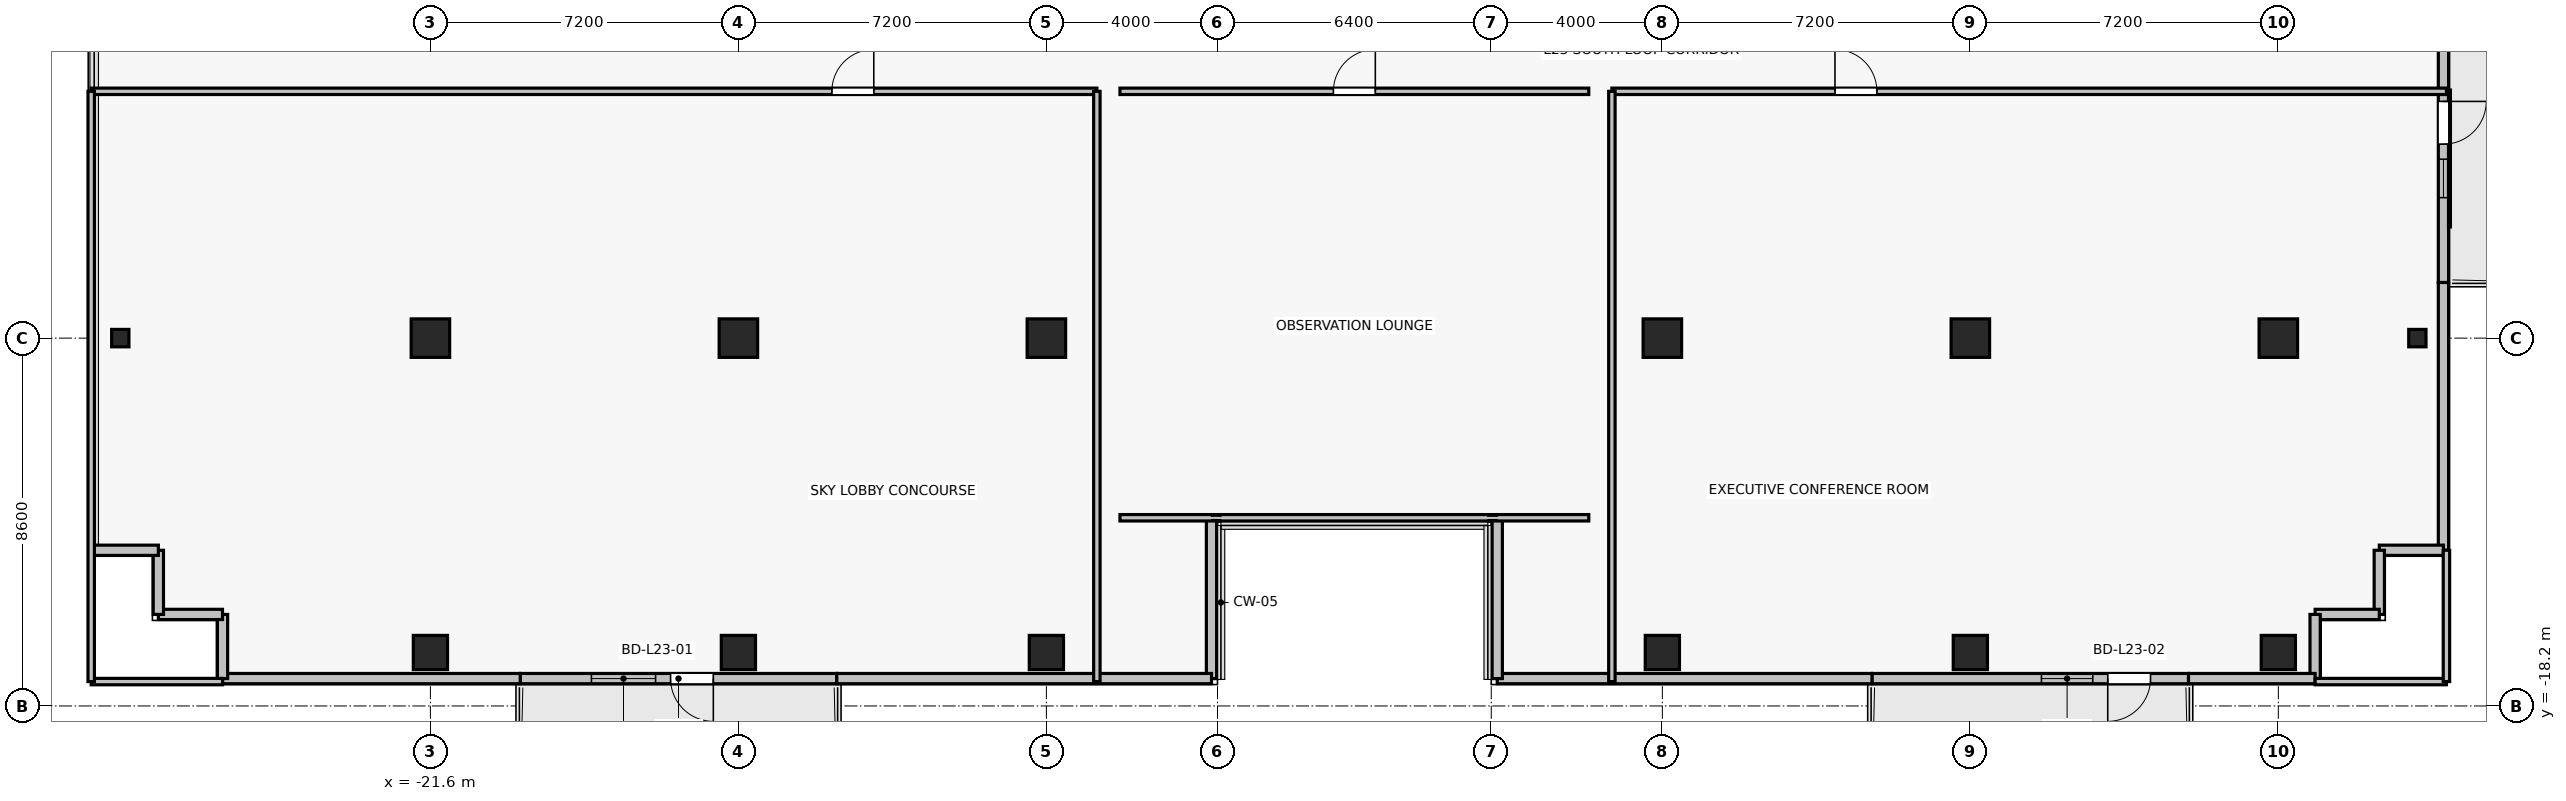
"""IFC4 building model, lengths in metres.
Left out: names, types, materials, properties, quantities, classifications, styles, units other than length and angle.
Written with IfcOpenShell. Run it as: python <this file> out.ifc"""

import sys

from ifc_helpers import new_model, si_unit, direction, frame, frame_2d, origin, origin_2d, place, context, subcontext, project, spatial, rectangle, i_section, extrude, source, transform, mapped, element, fill, save


model = new_model("IFC4")
c1 = context("Model", 3, precision=1e-05, world=origin(), true_north=direction((0.0, 1.0)))
c2 = subcontext(c1, "Body", "Model", "MODEL_VIEW")
j1 = project(units=[si_unit("LENGTHUNIT", "METRE"), si_unit("PLANEANGLEUNIT", "RADIAN")], contexts=[c1])
p1 = place(None, origin())
s1 = spatial("IfcSite", under=j1, at=p1, CompositionType="ELEMENT")
p2 = place(p1, origin())
s2 = spatial("IfcBuilding", under=s1, at=p2, CompositionType="ELEMENT")
p3 = place(p2, frame((0.0, 0.0, 86.8)))
s3 = spatial("IfcBuildingStorey", under=s2, at=p3, CompositionType="ELEMENT", Elevation=86.8)
for number, where, z_axis, x_axis in (
    (1, (-14.4, -9.6, 0.0), (0.0, 0.0, 1.0), (1.0, 0.0, 0.0)),
    (2, (-7.2, -9.6, 0.0), (0.0, 0.0, 1.0), (1.0, 0.0, 0.0)),
    (3, (7.2, -9.6, 0.0), (0.0, 0.0, 1.0), (1.0, 0.0, 0.0)),
    (4, (14.4, -9.6, 0.0), (0.0, 0.0, 1.0), (1.0, 0.0, 0.0)),
    (5, (-21.6, -9.6, 0.0), (0.0, 0.0, 1.0), (1.0, 0.0, 0.0)),
    (6, (21.6, -9.6, 0.0), (0.0, 0.0, 1.0), (1.0, 0.0, 0.0)),
):
    element("IfcColumn", number, at=place(p3, frame(where, z_axis=z_axis, x_axis=x_axis)), inside=s3, PredefinedType="COLUMN", context=c2, shape_type="SweptSolid", body=[
        extrude(rectangle(XDim=0.9, YDim=0.9, at=origin_2d()), origin(), (0.0, 0.0, 1.0), 3.3),
    ])
for number, where, z_axis, x_axis in (
    (7, (-14.4, -16.95, 0.0), (0.0, 0.0, 1.0), (1.0, 0.0, 0.0)),
    (8, (-7.2, -16.95, 0.0), (0.0, 0.0, 1.0), (1.0, 0.0, 0.0)),
    (9, (7.2, -16.95, 0.0), (0.0, 0.0, 1.0), (1.0, 0.0, 0.0)),
    (10, (14.4, -16.95, 0.0), (0.0, 0.0, 1.0), (1.0, 0.0, 0.0)),
    (11, (-21.6, -16.95, 0.0), (0.0, 0.0, 1.0), (1.0, 0.0, 0.0)),
    (12, (21.6, -16.95, 0.0), (0.0, 0.0, 1.0), (1.0, 0.0, 0.0)),
):
    element("IfcColumn", number, at=place(p3, frame(where, z_axis=z_axis, x_axis=x_axis)), inside=s3, PredefinedType="COLUMN", context=c2, shape_type="SweptSolid", body=[
        extrude(rectangle(XDim=0.8, YDim=0.8, at=origin_2d()), origin(), (0.0, 0.0, 1.0), 3.3),
    ])
for number, where, z_axis, x_axis in (
    (13, (-28.85, -9.6, 0.0), (0.0, 0.0, 1.0), (1.0, 0.0, 0.0)),
    (14, (24.85, -9.6, 0.0), (0.0, 0.0, 1.0), (1.0, 0.0, 0.0)),
):
    element("IfcColumn", number, at=place(p3, frame(where, z_axis=z_axis, x_axis=x_axis)), inside=s3, PredefinedType="COLUMN", context=c2, shape_type="SweptSolid", body=[
        extrude(i_section(OverallWidth=0.404, OverallDepth=0.407, WebThickness=0.022, FlangeThickness=0.032, FilletRadius=0.015, at=origin_2d()), origin(), (0.0, 0.0, 1.0), 3.3),
    ])
p4 = place(p3, frame((-12.1, -17.56, 0.0), z_axis=(0.0, 0.0, 1.0), x_axis=(-1.0, 0.0, 0.0)))
e15 = element("IfcWall", 15, at=p4, inside=s3, PredefinedType="SOLIDWALL", context=c2, shape_type="SweptSolid", body=[
    extrude(rectangle(XDim=7.4, YDim=0.24, at=frame_2d((3.7, 0.0))), origin(), (0.0, 0.0, 1.0), 2.665),
])
p5 = place(p4, frame((2.886, 0.0, 0.0)))
e16 = element("IfcOpeningElement", 16, at=p5, cuts=e15, PredefinedType="OPENING", context=c2, shape_type="SweptSolid", body=[
    extrude(rectangle(XDim=1.0, YDim=2.2, at=frame_2d((0.5, 1.1))), frame((0.0, 0.13, 0.0), z_axis=(0.0, -1.0, 0.0), x_axis=(1.0, 0.0, 0.0)), (0.0, 0.0, 1.0), 0.26),
])
p6 = place(p4, frame((4.236, 0.0, 0.85)))
e17 = element("IfcOpeningElement", 17, at=p6, cuts=e15, PredefinedType="OPENING", context=c2, shape_type="SweptSolid", body=[
    extrude(rectangle(XDim=1.5, YDim=1.6, at=frame_2d((0.75, 0.8))), frame((0.0, 0.13, 0.0), z_axis=(0.0, -1.0, 0.0), x_axis=(1.0, 0.0, 0.0)), (0.0, 0.0, 1.0), 0.26),
])
p7 = place(p3, frame((19.5, -17.56, 0.0), z_axis=(0.0, 0.0, 1.0), x_axis=(-1.0, 0.0, 0.0)))
e18 = element("IfcWall", 18, at=p7, inside=s3, PredefinedType="SOLIDWALL", context=c2, shape_type="SweptSolid", body=[
    extrude(rectangle(XDim=7.4, YDim=0.24, at=frame_2d((3.7, 0.0))), origin(), (0.0, 0.0, 1.0), 2.665),
])
p8 = place(p7, frame((0.888, 0.0, 0.0)))
e19 = element("IfcOpeningElement", 19, at=p8, cuts=e18, PredefinedType="OPENING", context=c2, shape_type="SweptSolid", body=[
    extrude(rectangle(XDim=1.0, YDim=2.2, at=frame_2d((0.5, 1.1))), frame((0.0, 0.13, 0.0), z_axis=(0.0, -1.0, 0.0), x_axis=(1.0, 0.0, 0.0)), (0.0, 0.0, 1.0), 0.26),
])
p9 = place(p7, frame((2.238, 0.0, 0.85)))
e20 = element("IfcOpeningElement", 20, at=p9, cuts=e18, PredefinedType="OPENING", context=c2, shape_type="SweptSolid", body=[
    extrude(rectangle(XDim=1.2, YDim=1.5, at=frame_2d((0.6, 0.75))), frame((0.0, 0.13, 0.0), z_axis=(0.0, -1.0, 0.0), x_axis=(1.0, 0.0, 0.0)), (0.0, 0.0, 1.0), 0.26),
])
p10 = place(p3, frame((25.46, -2.5, 0.0), z_axis=(0.0, 0.0, 1.0), x_axis=(0.0, -1.0, 0.0)))
e21 = element("IfcWall", 21, at=p10, inside=s3, PredefinedType="SOLIDWALL", context=c2, shape_type="SweptSolid", body=[
    extrude(rectangle(XDim=5.8, YDim=0.24, at=frame_2d((2.9, 0.0))), origin(), (0.0, 0.0, 1.0), 3.075),
])
p11 = place(p10, frame((1.566, 0.0, 0.0)))
e22 = element("IfcOpeningElement", 22, at=p11, cuts=e21, PredefinedType="OPENING", context=c2, shape_type="SweptSolid", body=[
    extrude(rectangle(XDim=1.0, YDim=2.2, at=frame_2d((0.5, 1.1))), frame((0.0, 0.13, 0.0), z_axis=(0.0, -1.0, 0.0), x_axis=(1.0, 0.0, 0.0)), (0.0, 0.0, 1.0), 0.26),
])
p12 = place(p10, frame((2.916, 0.0, 0.85)))
e23 = element("IfcOpeningElement", 23, at=p12, cuts=e21, PredefinedType="OPENING", context=c2, shape_type="SweptSolid", body=[
    extrude(rectangle(XDim=0.9, YDim=1.35, at=frame_2d((0.45, 0.675))), frame((0.0, 0.13, 0.0), z_axis=(0.0, -1.0, 0.0), x_axis=(1.0, 0.0, 0.0)), (0.0, 0.0, 1.0), 0.26),
])
p13 = place(p3, frame((25.46, -14.56, 0.0), z_axis=(0.0, 0.0, 1.0), x_axis=(0.0, 1.0, 0.0)))
e24 = element("IfcWall", 24, at=p13, inside=s3, PredefinedType="SOLIDWALL", context=c2, shape_type="SweptSolid", body=[
    extrude(rectangle(XDim=6.26, YDim=0.24, at=frame_2d((3.13, 0.0))), origin(), (0.0, 0.0, 1.0), 3.075),
])
for number, where, z_axis, x_axis in (
    (25, (23.96, -14.56, 0.0), (0.0, 0.0, 1.0), (1.0, 0.0, 0.0)),
    (26, (23.96, -16.06, 0.0), (0.0, 0.0, 1.0), (0.0, 1.0, 0.0)),
    (27, (22.46, -16.06, 0.0), (0.0, 0.0, 1.0), (1.0, 0.0, 0.0)),
):
    element("IfcWall", number, at=place(p3, frame(where, z_axis=z_axis, x_axis=x_axis)), inside=s3, PredefinedType="SOLIDWALL", context=c2, shape_type="SweptSolid", body=[
        extrude(rectangle(XDim=1.5, YDim=0.24, at=frame_2d((0.75, 0.0))), origin(), (0.0, 0.0, 1.0), 3.075),
    ])
p14 = place(p3, frame((22.46, -17.56, 0.0), z_axis=(0.0, 0.0, 1.0), x_axis=(0.0, 1.0, 0.0)))
e28 = element("IfcWall", 28, at=p14, inside=s3, PredefinedType="SOLIDWALL", context=c2, shape_type="SweptSolid", body=[
    extrude(rectangle(XDim=1.5, YDim=0.24, at=frame_2d((0.75, 0.0))), origin(), (0.0, 0.0, 1.0), 2.565),
])
p15 = place(p3, frame((19.5, -17.56, 0.0), z_axis=(0.0, 0.0, 1.0), x_axis=(1.0, 0.0, 0.0)))
e29 = element("IfcWall", 29, at=p15, inside=s3, PredefinedType="SOLIDWALL", context=c2, shape_type="SweptSolid", body=[
    extrude(rectangle(XDim=2.96, YDim=0.24, at=frame_2d((1.48, 0.0))), origin(), (0.0, 0.0, 1.0), 2.665),
])
p16 = place(p3, frame((3.34, -17.56, 0.0), z_axis=(0.0, 0.0, 1.0), x_axis=(1.0, 0.0, 0.0)))
e30 = element("IfcWall", 30, at=p16, inside=s3, PredefinedType="SOLIDWALL", context=c2, shape_type="SweptSolid", body=[
    extrude(rectangle(XDim=8.76, YDim=0.24, at=frame_2d((4.38, 0.0))), origin(), (0.0, 0.0, 1.0), 3.075),
])
for number, where, z_axis, x_axis in (
    (31, (3.34, -13.76, 0.0), (0.0, 0.0, 1.0), (0.0, -1.0, 0.0)),
    (32, (-3.34, -17.56, 0.0), (0.0, 0.0, 1.0), (0.0, 1.0, 0.0)),
):
    element("IfcWall", number, at=place(p3, frame(where, z_axis=z_axis, x_axis=x_axis)), inside=s3, PredefinedType="SOLIDWALL", context=c2, shape_type="SweptSolid", body=[
        extrude(rectangle(XDim=3.8, YDim=0.24, at=frame_2d((1.9, 0.0))), origin(), (0.0, 0.0, 1.0), 2.515),
    ])
p17 = place(p3, frame((-12.1, -17.56, 0.0), z_axis=(0.0, 0.0, 1.0), x_axis=(1.0, 0.0, 0.0)))
e33 = element("IfcWall", 33, at=p17, inside=s3, PredefinedType="SOLIDWALL", context=c2, shape_type="SweptSolid", body=[
    extrude(rectangle(XDim=8.76, YDim=0.24, at=frame_2d((4.38, 0.0))), origin(), (0.0, 0.0, 1.0), 3.075),
])
p18 = place(p3, frame((-26.46, -17.56, 0.0), z_axis=(0.0, 0.0, 1.0), x_axis=(1.0, 0.0, 0.0)))
e34 = element("IfcWall", 34, at=p18, inside=s3, PredefinedType="SOLIDWALL", context=c2, shape_type="SweptSolid", body=[
    extrude(rectangle(XDim=6.96, YDim=0.24, at=frame_2d((3.48, 0.0))), origin(), (0.0, 0.0, 1.0), 2.665),
])
for number, where, z_axis, x_axis in (
    (35, (-26.46, -16.06, 0.0), (0.0, 0.0, 1.0), (0.0, -1.0, 0.0)),
    (36, (-27.96, -16.06, 0.0), (0.0, 0.0, 1.0), (1.0, 0.0, 0.0)),
    (37, (-27.96, -14.56, 0.0), (0.0, 0.0, 1.0), (0.0, -1.0, 0.0)),
    (38, (-29.46, -14.56, 0.0), (0.0, 0.0, 1.0), (1.0, 0.0, 0.0)),
):
    element("IfcWall", number, at=place(p3, frame(where, z_axis=z_axis, x_axis=x_axis)), inside=s3, PredefinedType="SOLIDWALL", context=c2, shape_type="SweptSolid", body=[
        extrude(rectangle(XDim=1.5, YDim=0.24, at=frame_2d((0.75, 0.0))), origin(), (0.0, 0.0, 1.0), 3.075),
    ])
p19 = place(p3, frame((-26.46, -17.63, 0.0), z_axis=(0.0, 0.0, 1.0), x_axis=(-1.0, 0.0, 0.0)))
e39 = element("IfcWall", 39, at=p19, inside=s3, PredefinedType="PARTITIONING", context=c2, shape_type="SweptSolid", body=[
    extrude(rectangle(XDim=3.07, YDim=0.15, at=frame_2d((1.535, 0.0))), origin(), (0.0, 0.0, 1.0), 2.665),
])
p20 = place(p3, frame((-29.53, -3.83, 0.0), z_axis=(0.0, 0.0, 1.0), x_axis=(1.0, 0.0, 0.0)))
e40 = element("IfcWall", 40, at=p20, inside=s3, PredefinedType="PARTITIONING", context=c2, shape_type="SweptSolid", body=[
    extrude(rectangle(XDim=23.51, YDim=0.15, at=frame_2d((11.755, 0.0))), origin(), (0.0, 0.0, 1.0), 2.515),
])
p21 = place(p20, frame((17.315, 0.0, 0.0)))
e41 = element("IfcOpeningElement", 41, at=p21, cuts=e40, PredefinedType="OPENING", context=c2, shape_type="SweptSolid", body=[
    extrude(rectangle(XDim=0.98, YDim=2.15, at=frame_2d((0.49, 1.075))), frame((0.0, 0.085, 0.0), z_axis=(0.0, -1.0, 0.0), x_axis=(1.0, 0.0, 0.0)), (0.0, 0.0, 1.0), 0.17),
])
p22 = place(p3, frame((-29.53, -17.63, 0.0), z_axis=(0.0, 0.0, 1.0), x_axis=(0.0, 1.0, 0.0)))
e42 = element("IfcWall", 42, at=p22, inside=s3, PredefinedType="PARTITIONING", context=c2, shape_type="SweptSolid", body=[
    extrude(rectangle(XDim=13.8, YDim=0.15, at=frame_2d((6.9, 0.0))), origin(), (0.0, 0.0, 1.0), 2.665),
])
p23 = place(p3, frame((-6.02, -3.83, 0.0), z_axis=(0.0, 0.0, 1.0), x_axis=(0.0, -1.0, 0.0)))
e43 = element("IfcWall", 43, at=p23, inside=s3, PredefinedType="PARTITIONING", context=c2, shape_type="SweptSolid", body=[
    extrude(rectangle(XDim=13.8, YDim=0.15, at=frame_2d((6.9, 0.0))), origin(), (0.0, 0.0, 1.0), 2.515),
])
p24 = place(p3, frame((25.53, -17.63, 0.0), z_axis=(0.0, 0.0, 1.0), x_axis=(-1.0, 0.0, 0.0)))
e44 = element("IfcWall", 44, at=p24, inside=s3, PredefinedType="PARTITIONING", context=c2, shape_type="SweptSolid", body=[
    extrude(rectangle(XDim=3.07, YDim=0.15, at=frame_2d((1.535, 0.0))), origin(), (0.0, 0.0, 1.0), 2.665),
])
p25 = place(p3, frame((6.02, -3.83, 0.0), z_axis=(0.0, 0.0, 1.0), x_axis=(1.0, 0.0, 0.0)))
e45 = element("IfcWall", 45, at=p25, inside=s3, PredefinedType="PARTITIONING", context=c2, shape_type="SweptSolid", body=[
    extrude(rectangle(XDim=19.51, YDim=0.15, at=frame_2d((9.755, 0.0))), origin(), (0.0, 0.0, 1.0), 2.515),
])
p26 = place(p25, frame((5.215, 0.0, 0.0)))
e46 = element("IfcOpeningElement", 46, at=p26, cuts=e45, PredefinedType="OPENING", context=c2, shape_type="SweptSolid", body=[
    extrude(rectangle(XDim=0.98, YDim=2.15, at=frame_2d((0.49, 1.075))), frame((0.0, 0.085, 0.0), z_axis=(0.0, -1.0, 0.0), x_axis=(1.0, 0.0, 0.0)), (0.0, 0.0, 1.0), 0.17),
])
p27 = place(p3, frame((6.02, -17.63, 0.0), z_axis=(0.0, 0.0, 1.0), x_axis=(0.0, 1.0, 0.0)))
e47 = element("IfcWall", 47, at=p27, inside=s3, PredefinedType="PARTITIONING", context=c2, shape_type="SweptSolid", body=[
    extrude(rectangle(XDim=13.8, YDim=0.15, at=frame_2d((6.9, 0.0))), origin(), (0.0, 0.0, 1.0), 2.515),
])
p28 = place(p3, frame((25.53, -14.56, 0.0), z_axis=(0.0, 0.0, 1.0), x_axis=(0.0, -1.0, 0.0)))
e48 = element("IfcWall", 48, at=p28, inside=s3, PredefinedType="PARTITIONING", context=c2, shape_type="SweptSolid", body=[
    extrude(rectangle(XDim=3.07, YDim=0.15, at=frame_2d((1.535, 0.0))), origin(), (0.0, 0.0, 1.0), 3.075),
])
p29 = place(p3, frame((5.48, -13.8, 0.0), z_axis=(0.0, 0.0, 1.0), x_axis=(-1.0, 0.0, 0.0)))
e49 = element("IfcWall", 49, at=p29, inside=s3, PredefinedType="PARTITIONING", context=c2, shape_type="SweptSolid", body=[
    extrude(rectangle(XDim=10.96, YDim=0.15, at=frame_2d((5.48, 0.0))), origin(), (0.0, 0.0, 1.0), 2.565),
])
p30 = place(p3, frame((-5.48, -3.83, 0.0), z_axis=(0.0, 0.0, 1.0), x_axis=(1.0, 0.0, 0.0)))
e50 = element("IfcWall", 50, at=p30, inside=s3, PredefinedType="PARTITIONING", context=c2, shape_type="SweptSolid", body=[
    extrude(rectangle(XDim=10.96, YDim=0.15, at=frame_2d((5.48, 0.0))), origin(), (0.0, 0.0, 1.0), 3.075),
])
p31 = place(p30, frame((4.99, 0.0, 0.0)))
e51 = element("IfcOpeningElement", 51, at=p31, cuts=e50, PredefinedType="OPENING", context=c2, shape_type="SweptSolid", body=[
    extrude(rectangle(XDim=0.98, YDim=2.15, at=frame_2d((0.49, 1.075))), frame((0.0, 0.085, 0.0), z_axis=(0.0, -1.0, 0.0), x_axis=(1.0, 0.0, 0.0)), (0.0, 0.0, 1.0), 0.17),
])
m1 = source(origin(), c2, "Body", "SweptSolid", [
    extrude(rectangle(XDim=1.0, YDim=2.2, at=frame_2d((0.5, 1.1))), frame((0.0, 0.025, 0.0), z_axis=(0.0, -1.0, 0.0), x_axis=(1.0, 0.0, 0.0)), (0.0, 0.0, 1.0), 0.05),
])
p32 = place(p5, origin())
e52 = element("IfcDoor", 52, at=p32, inside=s3, OperationType="SINGLE_SWING_LEFT", PredefinedType="DOOR", context=c2, shape_type="MappedRepresentation", body=[
    mapped(m1, transform((0.0, 0.0, 0.0), x_axis=(1.0, 0.0, 0.0), y_axis=(0.0, 1.0, 0.0), z_axis=(0.0, 0.0, 1.0), scale=1.0)),
])
fill(e16, e52)
m2 = source(origin(), c2, "Body", "SweptSolid", [
    extrude(rectangle(XDim=1.5, YDim=1.6, at=frame_2d((0.75, 0.8))), frame((0.0, 0.03, 0.0), z_axis=(0.0, -1.0, 0.0), x_axis=(1.0, 0.0, 0.0)), (0.0, 0.0, 1.0), 0.06),
])
p33 = place(p6, origin())
e53 = element("IfcWindow", 53, at=p33, inside=s3, PartitioningType="SINGLE_PANEL", PredefinedType="WINDOW", context=c2, shape_type="MappedRepresentation", body=[
    mapped(m2, transform((0.0, 0.0, 0.0), x_axis=(1.0, 0.0, 0.0), y_axis=(0.0, 1.0, 0.0), z_axis=(0.0, 0.0, 1.0), scale=1.0)),
])
fill(e17, e53)
p34 = place(p8, origin())
e54 = element("IfcDoor", 54, at=p34, inside=s3, OperationType="SINGLE_SWING_RIGHT", PredefinedType="DOOR", context=c2, shape_type="MappedRepresentation", body=[
    mapped(m1, transform((0.0, 0.0, 0.0), x_axis=(1.0, 0.0, 0.0), y_axis=(0.0, 1.0, 0.0), z_axis=(0.0, 0.0, 1.0), scale=1.0)),
])
fill(e19, e54)
m3 = source(origin(), c2, "Body", "SweptSolid", [
    extrude(rectangle(XDim=1.2, YDim=1.5, at=frame_2d((0.6, 0.75))), frame((0.0, 0.03, 0.0), z_axis=(0.0, -1.0, 0.0), x_axis=(1.0, 0.0, 0.0)), (0.0, 0.0, 1.0), 0.06),
])
p35 = place(p9, origin())
e55 = element("IfcWindow", 55, at=p35, inside=s3, PartitioningType="SINGLE_PANEL", PredefinedType="WINDOW", context=c2, shape_type="MappedRepresentation", body=[
    mapped(m3, transform((0.0, 0.0, 0.0), x_axis=(1.0, 0.0, 0.0), y_axis=(0.0, 1.0, 0.0), z_axis=(0.0, 0.0, 1.0), scale=1.0)),
])
fill(e20, e55)
p36 = place(p11, origin())
e56 = element("IfcDoor", 56, at=p36, inside=s3, OperationType="SINGLE_SWING_LEFT", PredefinedType="DOOR", context=c2, shape_type="MappedRepresentation", body=[
    mapped(m1, transform((0.0, 0.0, 0.0), x_axis=(1.0, 0.0, 0.0), y_axis=(0.0, 1.0, 0.0), z_axis=(0.0, 0.0, 1.0), scale=1.0)),
])
fill(e22, e56)
m4 = source(origin(), c2, "Body", "SweptSolid", [
    extrude(rectangle(XDim=0.9, YDim=1.35, at=frame_2d((0.45, 0.675))), frame((0.0, 0.03, 0.0), z_axis=(0.0, -1.0, 0.0), x_axis=(1.0, 0.0, 0.0)), (0.0, 0.0, 1.0), 0.06),
])
p37 = place(p12, origin())
e57 = element("IfcWindow", 57, at=p37, inside=s3, PartitioningType="SINGLE_PANEL", PredefinedType="WINDOW", context=c2, shape_type="MappedRepresentation", body=[
    mapped(m4, transform((0.0, 0.0, 0.0), x_axis=(1.0, 0.0, 0.0), y_axis=(0.0, 1.0, 0.0), z_axis=(0.0, 0.0, 1.0), scale=1.0)),
])
fill(e23, e57)
m5 = source(origin(), c2, "Body", "SweptSolid", [
    extrude(rectangle(XDim=0.98, YDim=2.15, at=frame_2d((0.49, 1.075))), frame((0.0, 0.025, 0.0), z_axis=(0.0, -1.0, 0.0), x_axis=(1.0, 0.0, 0.0)), (0.0, 0.0, 1.0), 0.05),
])
p38 = place(p21, origin())
e58 = element("IfcDoor", 58, at=p38, inside=s3, OperationType="SINGLE_SWING_RIGHT", PredefinedType="DOOR", context=c2, shape_type="MappedRepresentation", body=[
    mapped(m5, transform((0.0, 0.0, 0.0), x_axis=(1.0, 0.0, 0.0), y_axis=(0.0, 1.0, 0.0), z_axis=(0.0, 0.0, 1.0), scale=1.0)),
])
fill(e41, e58)
p39 = place(p26, origin())
e59 = element("IfcDoor", 59, at=p39, inside=s3, OperationType="SINGLE_SWING_LEFT", PredefinedType="DOOR", context=c2, shape_type="MappedRepresentation", body=[
    mapped(m5, transform((0.0, 0.0, 0.0), x_axis=(1.0, 0.0, 0.0), y_axis=(0.0, 1.0, 0.0), z_axis=(0.0, 0.0, 1.0), scale=1.0)),
])
fill(e46, e59)
p40 = place(p31, origin())
e60 = element("IfcDoor", 60, at=p40, inside=s3, OperationType="SINGLE_SWING_RIGHT", PredefinedType="DOOR", context=c2, shape_type="MappedRepresentation", body=[
    mapped(m5, transform((0.0, 0.0, 0.0), x_axis=(1.0, 0.0, 0.0), y_axis=(0.0, 1.0, 0.0), z_axis=(0.0, 0.0, 1.0), scale=1.0)),
])
fill(e51, e60)
save(model, sys.argv[1])
